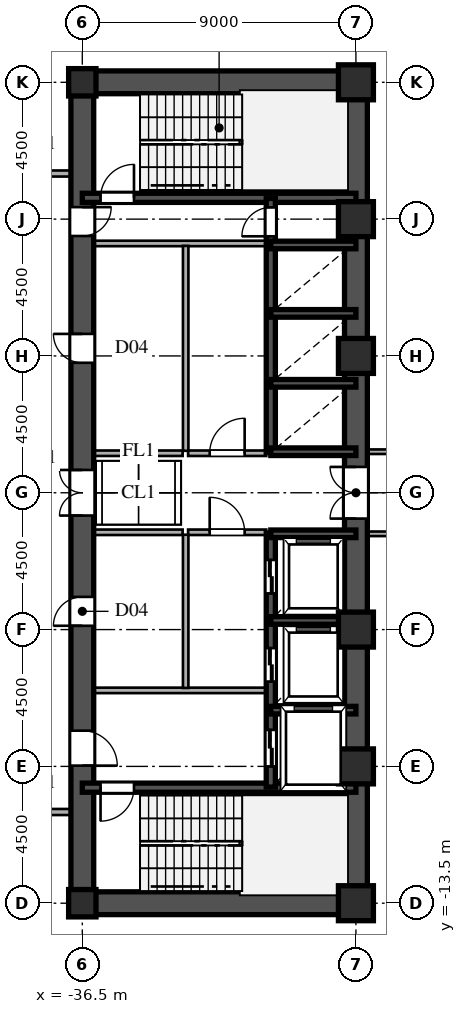
"""IFC4 building model, lengths in metres.
Left out: names, types, materials, properties, quantities, classifications, styles, units other than length and angle.
Written with IfcOpenShell. Run it as: python <this file> out.ifc"""

import sys

from ifc_helpers import new_model, si_unit, direction, frame, frame_2d, origin, origin_2d, place, context, subcontext, project, spatial, rectangle, hollow_rectangle, i_section, extrude, source, transform, mapped, element, fill, save


model = new_model("IFC4")
c1 = context("Model", 3, precision=1e-05, world=origin(), true_north=direction((0.0, 1.0)))
c2 = subcontext(c1, "Body", "Model", "MODEL_VIEW")
j1 = project(units=[si_unit("LENGTHUNIT", "METRE"), si_unit("PLANEANGLEUNIT", "RADIAN")], contexts=[c1])
p1 = place(None, origin())
s1 = spatial("IfcSite", under=j1, at=p1, CompositionType="ELEMENT")
p2 = place(p1, origin())
s2 = spatial("IfcBuilding", under=s1, at=p2, CompositionType="ELEMENT")
p3 = place(p2, frame((0.0, 0.0, 5.4)))
s3 = spatial("IfcBuildingStorey", under=s2, at=p3, CompositionType="ELEMENT", Elevation=5.4)
m1 = source(origin(), c2, "Body", "SweptSolid", [
    extrude(hollow_rectangle(XDim=1.15, YDim=1.15, WallThickness=0.048, at=origin_2d()), origin(), (0.0, 0.0, 1.0), 4.5),
])
for number, where, z_axis, x_axis in (
    (1, (-27.5, -13.5, 0.0), (0.0, 0.0, 1.0), (1.0, 0.0, 0.0)),
    (2, (-27.5, -9.0, 0.0), (0.0, 0.0, 1.0), (1.0, 0.0, 0.0)),
    (3, (-27.5, -4.5, 0.0), (0.0, 0.0, 1.0), (1.0, 0.0, 0.0)),
    (4, (-27.5, 4.5, 0.0), (0.0, 0.0, 1.0), (1.0, 0.0, 0.0)),
    (5, (-27.5, 9.0, 0.0), (0.0, 0.0, 1.0), (1.0, 0.0, 0.0)),
    (6, (-27.5, 13.5, 0.0), (0.0, 0.0, 1.0), (1.0, 0.0, 0.0)),
):
    element("IfcColumn", number, at=place(p3, frame(where, z_axis=z_axis, x_axis=x_axis)), inside=s3, PredefinedType="COLUMN", context=c2, shape_type="MappedRepresentation", body=[
        mapped(m1, transform((0.0, 0.0, 0.0), scale=1.0)),
    ])
m2 = source(origin(), c2, "Body", "SweptSolid", [
    extrude(i_section(OverallWidth=0.9, OverallDepth=0.9, WebThickness=0.036, FlangeThickness=0.055, at=origin_2d()), origin(), (0.0, 0.0, 1.0), 4.5),
])
for number, where, z_axis, x_axis in (
    (7, (-36.5, -13.5, 0.0), (0.0, 0.0, 1.0), (1.0, 0.0, 0.0)),
    (8, (-36.5, 13.5, 0.0), (0.0, 0.0, 1.0), (1.0, 0.0, 0.0)),
):
    element("IfcColumn", number, at=place(p3, frame(where, z_axis=z_axis, x_axis=x_axis)), inside=s3, PredefinedType="COLUMN", context=c2, shape_type="MappedRepresentation", body=[
        mapped(m2, transform((0.0, 0.0, 0.0), scale=1.0)),
    ])
for number, where, z_axis, x_axis in (
    (9, (-27.5, -13.5, 0.0), (0.0, 0.0, 1.0), (0.0, 1.0, 0.0)),
    (10, (-27.5, 1.3, 0.0), (0.0, 0.0, 1.0), (0.0, 1.0, 0.0)),
):
    element("IfcWall", number, at=place(p3, frame(where, z_axis=z_axis, x_axis=x_axis)), inside=s3, PredefinedType="SHEAR", context=c2, shape_type="SweptSolid", body=[
        extrude(rectangle(XDim=12.2, YDim=0.75, at=frame_2d((6.1, 0.0))), origin(), (0.0, 0.0, 1.0), 4.22),
    ])
p4 = place(p3, frame((-27.5, -1.3, 0.0), z_axis=(0.0, 0.0, 1.0), x_axis=(0.0, 1.0, 0.0)))
e11 = element("IfcWall", 11, at=p4, inside=s3, PredefinedType="SHEAR", context=c2, shape_type="SweptSolid", body=[
    extrude(rectangle(XDim=2.6, YDim=0.75, at=frame_2d((1.3, 0.0))), origin(), (0.0, 0.0, 1.0), 4.22),
])
p5 = place(p4, frame((0.45, 0.0, 0.0)))
e12 = element("IfcOpeningElement", 12, at=p5, cuts=e11, PredefinedType="OPENING", context=c2, shape_type="SweptSolid", body=[
    extrude(rectangle(XDim=1.7, YDim=2.35, at=frame_2d((0.85, 1.175))), frame((0.0, 0.385, 0.0), z_axis=(0.0, -1.0, 0.0), x_axis=(1.0, 0.0, 0.0)), (0.0, 0.0, 1.0), 0.77),
])
for number, where, z_axis, x_axis in (
    (13, (-36.5, -13.5, 0.0), (0.0, 0.0, 1.0), (1.0, 0.0, 0.0)),
    (14, (-36.5, 13.5, 0.0), (0.0, 0.0, 1.0), (1.0, 0.0, 0.0)),
):
    element("IfcWall", number, at=place(p3, frame(where, z_axis=z_axis, x_axis=x_axis)), inside=s3, PredefinedType="SHEAR", context=c2, shape_type="SweptSolid", body=[
        extrude(rectangle(XDim=9.0, YDim=0.75, at=frame_2d((4.5, 0.0))), origin(), (0.0, 0.0, 1.0), 4.22),
    ])
p6 = place(p3, frame((-36.5, -13.65, 0.0), z_axis=(0.0, 0.0, 1.0), x_axis=(0.0, 1.0, 0.0)))
e15 = element("IfcWall", 15, at=p6, inside=s3, PredefinedType="SHEAR", context=c2, shape_type="SweptSolid", body=[
    extrude(rectangle(XDim=7.15, YDim=0.75, at=frame_2d((3.575, 0.0))), origin(), (0.0, 0.0, 1.0), 4.22),
])
p7 = place(p6, frame((4.675, 0.0, 0.0)))
e16 = element("IfcOpeningElement", 16, at=p7, cuts=e15, PredefinedType="OPENING", context=c2, shape_type="SweptSolid", body=[
    extrude(rectangle(XDim=1.15, YDim=2.2, at=frame_2d((0.575, 1.1))), frame((0.0, 0.385, 0.0), z_axis=(0.0, -1.0, 0.0), x_axis=(1.0, 0.0, 0.0)), (0.0, 0.0, 1.0), 0.77),
])
p8 = place(p3, frame((-36.5, -1.3, 0.0), z_axis=(0.0, 0.0, 1.0), x_axis=(0.0, 1.0, 0.0)))
e17 = element("IfcWall", 17, at=p8, inside=s3, PredefinedType="SHEAR", context=c2, shape_type="SweptSolid", body=[
    extrude(rectangle(XDim=2.6, YDim=0.75, at=frame_2d((1.3, 0.0))), origin(), (0.0, 0.0, 1.0), 4.22),
])
p9 = place(p8, frame((0.55, 0.0, 0.0)))
e18 = element("IfcOpeningElement", 18, at=p9, cuts=e17, PredefinedType="OPENING", context=c2, shape_type="SweptSolid", body=[
    extrude(rectangle(XDim=1.5, YDim=2.3, at=frame_2d((0.75, 1.15))), frame((0.0, 0.385, 0.0), z_axis=(0.0, -1.0, 0.0), x_axis=(1.0, 0.0, 0.0)), (0.0, 0.0, 1.0), 0.77),
])
p10 = place(p3, frame((-36.5, 8.2, 0.0), z_axis=(0.0, 0.0, 1.0), x_axis=(0.0, 1.0, 0.0)))
e19 = element("IfcWall", 19, at=p10, inside=s3, PredefinedType="SHEAR", context=c2, shape_type="SweptSolid", body=[
    extrude(rectangle(XDim=5.45, YDim=0.75, at=frame_2d((2.725, 0.0))), origin(), (0.0, 0.0, 1.0), 4.22),
])
p11 = place(p10, frame((0.245, 0.0, 0.0)))
e20 = element("IfcOpeningElement", 20, at=p11, cuts=e19, PredefinedType="OPENING", context=c2, shape_type="SweptSolid", body=[
    extrude(rectangle(XDim=0.95, YDim=2.15, at=frame_2d((0.475, 1.075))), frame((0.0, 0.385, 0.0), z_axis=(0.0, -1.0, 0.0), x_axis=(1.0, 0.0, 0.0)), (0.0, 0.0, 1.0), 0.77),
])
p12 = place(p3, frame((-36.5, -6.5, 0.0), z_axis=(0.0, 0.0, 1.0), x_axis=(0.0, 1.0, 0.0)))
e21 = element("IfcWall", 21, at=p12, inside=s3, PredefinedType="SHEAR", context=c2, shape_type="SweptSolid", body=[
    extrude(rectangle(XDim=5.2, YDim=0.75, at=frame_2d((2.6, 0.0))), origin(), (0.0, 0.0, 1.0), 4.22),
])
p13 = place(p12, frame((2.125, 0.0, 0.0)))
e22 = element("IfcOpeningElement", 22, at=p13, cuts=e21, PredefinedType="OPENING", context=c2, shape_type="SweptSolid", body=[
    extrude(rectangle(XDim=0.95, YDim=2.15, at=frame_2d((0.475, 1.075))), frame((0.0, 0.385, 0.0), z_axis=(0.0, -1.0, 0.0), x_axis=(1.0, 0.0, 0.0)), (0.0, 0.0, 1.0), 0.77),
])
p14 = place(p3, frame((-36.5, 1.3, 0.0), z_axis=(0.0, 0.0, 1.0), x_axis=(0.0, 1.0, 0.0)))
e23 = element("IfcWall", 23, at=p14, inside=s3, PredefinedType="SHEAR", context=c2, shape_type="SweptSolid", body=[
    extrude(rectangle(XDim=6.9, YDim=0.75, at=frame_2d((3.45, 0.0))), origin(), (0.0, 0.0, 1.0), 4.22),
])
p15 = place(p14, frame((2.975, 0.0, 0.0)))
e24 = element("IfcOpeningElement", 24, at=p15, cuts=e23, PredefinedType="OPENING", context=c2, shape_type="SweptSolid", body=[
    extrude(rectangle(XDim=0.95, YDim=2.15, at=frame_2d((0.475, 1.075))), frame((0.0, 0.385, 0.0), z_axis=(0.0, -1.0, 0.0), x_axis=(1.0, 0.0, 0.0)), (0.0, 0.0, 1.0), 0.77),
])
p16 = place(p3, frame((-36.5, -9.7, 0.0), z_axis=(0.0, 0.0, 1.0), x_axis=(1.0, 0.0, 0.0)))
e25 = element("IfcWall", 25, at=p16, inside=s3, PredefinedType="SHEAR", context=c2, shape_type="SweptSolid", body=[
    extrude(rectangle(XDim=9.0, YDim=0.3, at=frame_2d((4.5, 0.0))), origin(), (0.0, 0.0, 1.0), 4.22),
])
p17 = place(p16, frame((0.6, 0.0, 0.0)))
e26 = element("IfcOpeningElement", 26, at=p17, cuts=e25, PredefinedType="OPENING", context=c2, shape_type="SweptSolid", body=[
    extrude(rectangle(XDim=1.1, YDim=2.2, at=frame_2d((0.55, 1.1))), frame((0.0, 0.16, 0.0), z_axis=(0.0, -1.0, 0.0), x_axis=(1.0, 0.0, 0.0)), (0.0, 0.0, 1.0), 0.32),
])
p18 = place(p3, frame((-36.5, 9.7, 0.0), z_axis=(0.0, 0.0, 1.0), x_axis=(1.0, 0.0, 0.0)))
e27 = element("IfcWall", 27, at=p18, inside=s3, PredefinedType="SHEAR", context=c2, shape_type="SweptSolid", body=[
    extrude(rectangle(XDim=9.0, YDim=0.3, at=frame_2d((4.5, 0.0))), origin(), (0.0, 0.0, 1.0), 4.22),
])
p19 = place(p18, frame((0.6, 0.0, 0.0)))
e28 = element("IfcOpeningElement", 28, at=p19, cuts=e27, PredefinedType="OPENING", context=c2, shape_type="SweptSolid", body=[
    extrude(rectangle(XDim=1.1, YDim=2.2, at=frame_2d((0.55, 1.1))), frame((0.0, 0.16, 0.0), z_axis=(0.0, -1.0, 0.0), x_axis=(1.0, 0.0, 0.0)), (0.0, 0.0, 1.0), 0.32),
])
for number, where, z_axis, x_axis in (
    (29, (-30.3, -7.15, 0.0), (0.0, 0.0, 1.0), (1.0, 0.0, 0.0)),
    (30, (-30.3, -4.2, 0.0), (0.0, 0.0, 1.0), (1.0, 0.0, 0.0)),
    (31, (-30.3, -1.35, 0.0), (0.0, 0.0, 1.0), (1.0, 0.0, 0.0)),
    (32, (-30.3, 1.35, 0.0), (0.0, 0.0, 1.0), (1.0, 0.0, 0.0)),
    (33, (-30.3, 3.6, 0.0), (0.0, 0.0, 1.0), (1.0, 0.0, 0.0)),
    (34, (-30.3, 5.9, 0.0), (0.0, 0.0, 1.0), (1.0, 0.0, 0.0)),
    (35, (-30.3, 8.15, 0.0), (0.0, 0.0, 1.0), (1.0, 0.0, 0.0)),
):
    element("IfcWall", number, at=place(p3, frame(where, z_axis=z_axis, x_axis=x_axis)), inside=s3, PredefinedType="SHEAR", context=c2, shape_type="SweptSolid", body=[
        extrude(rectangle(XDim=2.8, YDim=0.25, at=frame_2d((1.4, 0.0))), origin(), (0.0, 0.0, 1.0), 4.22),
    ])
p20 = place(p3, frame((-30.3, -9.68, 0.0), z_axis=(0.0, 0.0, 1.0), x_axis=(0.0, 1.0, 0.0)))
e36 = element("IfcWall", 36, at=p20, inside=s3, PredefinedType="SHEAR", context=c2, shape_type="SweptSolid", body=[
    extrude(rectangle(XDim=2.56, YDim=0.3, at=frame_2d((1.28, 0.0))), origin(), (0.0, 0.0, 1.0), 4.22),
])
p21 = place(p20, frame((0.68, 0.0, 0.0)))
e37 = element("IfcOpeningElement", 37, at=p21, cuts=e36, PredefinedType="OPENING", context=c2, shape_type="SweptSolid", body=[
    extrude(rectangle(XDim=1.2, YDim=2.25, at=frame_2d((0.6, 1.125))), frame((0.0, 0.16, 0.0), z_axis=(0.0, -1.0, 0.0), x_axis=(1.0, 0.0, 0.0)), (0.0, 0.0, 1.0), 0.32),
])
p22 = place(p3, frame((-30.3, -7.12, 0.0), z_axis=(0.0, 0.0, 1.0), x_axis=(0.0, 1.0, 0.0)))
e38 = element("IfcWall", 38, at=p22, inside=s3, PredefinedType="SHEAR", context=c2, shape_type="SweptSolid", body=[
    extrude(rectangle(XDim=2.92, YDim=0.3, at=frame_2d((1.46, 0.0))), origin(), (0.0, 0.0, 1.0), 4.22),
])
p23 = place(p22, frame((0.91, 0.0, 0.0)))
e39 = element("IfcOpeningElement", 39, at=p23, cuts=e38, PredefinedType="OPENING", context=c2, shape_type="SweptSolid", body=[
    extrude(rectangle(XDim=1.1, YDim=2.2, at=frame_2d((0.55, 1.1))), frame((0.0, 0.16, 0.0), z_axis=(0.0, -1.0, 0.0), x_axis=(1.0, 0.0, 0.0)), (0.0, 0.0, 1.0), 0.32),
])
p24 = place(p3, frame((-30.3, -4.2, 0.0), z_axis=(0.0, 0.0, 1.0), x_axis=(0.0, 1.0, 0.0)))
e40 = element("IfcWall", 40, at=p24, inside=s3, PredefinedType="SHEAR", context=c2, shape_type="SweptSolid", body=[
    extrude(rectangle(XDim=2.88, YDim=0.3, at=frame_2d((1.44, 0.0))), origin(), (0.0, 0.0, 1.0), 4.22),
])
p25 = place(p24, frame((0.89, 0.0, 0.0)))
e41 = element("IfcOpeningElement", 41, at=p25, cuts=e40, PredefinedType="OPENING", context=c2, shape_type="SweptSolid", body=[
    extrude(rectangle(XDim=1.1, YDim=2.2, at=frame_2d((0.55, 1.1))), frame((0.0, 0.16, 0.0), z_axis=(0.0, -1.0, 0.0), x_axis=(1.0, 0.0, 0.0)), (0.0, 0.0, 1.0), 0.32),
])
p26 = place(p3, frame((-30.3, 1.32, 0.0), z_axis=(0.0, 0.0, 1.0), x_axis=(0.0, 1.0, 0.0)))
e42 = element("IfcWall", 42, at=p26, inside=s3, PredefinedType="SHEAR", context=c2, shape_type="SweptSolid", body=[
    extrude(rectangle(XDim=2.28, YDim=0.3, at=frame_2d((1.14, 0.0))), origin(), (0.0, 0.0, 1.0), 4.22),
])
p27 = place(p3, frame((-30.3, 3.6, 0.0), z_axis=(0.0, 0.0, 1.0), x_axis=(0.0, 1.0, 0.0)))
e43 = element("IfcWall", 43, at=p27, inside=s3, PredefinedType="SHEAR", context=c2, shape_type="SweptSolid", body=[
    extrude(rectangle(XDim=2.3, YDim=0.3, at=frame_2d((1.15, 0.0))), origin(), (0.0, 0.0, 1.0), 4.22),
])
p28 = place(p3, frame((-30.3, 5.9, 0.0), z_axis=(0.0, 0.0, 1.0), x_axis=(0.0, 1.0, 0.0)))
e44 = element("IfcWall", 44, at=p28, inside=s3, PredefinedType="SHEAR", context=c2, shape_type="SweptSolid", body=[
    extrude(rectangle(XDim=2.25, YDim=0.3, at=frame_2d((1.125, 0.0))), origin(), (0.0, 0.0, 1.0), 4.22),
])
p29 = place(p3, frame((-30.3, 8.15, 0.0), z_axis=(0.0, 0.0, 1.0), x_axis=(0.0, 1.0, 0.0)))
e45 = element("IfcWall", 45, at=p29, inside=s3, PredefinedType="SHEAR", context=c2, shape_type="SweptSolid", body=[
    extrude(rectangle(XDim=1.53, YDim=0.3, at=frame_2d((0.765, 0.0))), origin(), (0.0, 0.0, 1.0), 4.22),
])
p30 = place(p29, frame((0.285, 0.0, 0.0)))
e46 = element("IfcOpeningElement", 46, at=p30, cuts=e45, PredefinedType="OPENING", context=c2, shape_type="SweptSolid", body=[
    extrude(rectangle(XDim=0.95, YDim=2.15, at=frame_2d((0.475, 1.075))), frame((0.0, 0.16, 0.0), z_axis=(0.0, -1.0, 0.0), x_axis=(1.0, 0.0, 0.0)), (0.0, 0.0, 1.0), 0.32),
])
for number, where, z_axis, x_axis in (
    (47, (-36.15, -6.5, 0.0), (0.0, 0.0, 1.0), (1.0, 0.0, 0.0)),
    (48, (-36.15, 8.2, 0.0), (0.0, 0.0, 1.0), (1.0, 0.0, 0.0)),
):
    element("IfcWall", number, at=place(p3, frame(where, z_axis=z_axis, x_axis=x_axis)), inside=s3, PredefinedType="PARTITIONING", context=c2, shape_type="SweptSolid", body=[
        extrude(rectangle(XDim=5.7, YDim=0.18, at=frame_2d((2.85, 0.0))), origin(), (0.0, 0.0, 1.0), 4.22),
    ])
p31 = place(p3, frame((-33.1, -6.42, 0.0), z_axis=(0.0, 0.0, 1.0), x_axis=(0.0, 1.0, 0.0)))
e49 = element("IfcWall", 49, at=p31, inside=s3, PredefinedType="PARTITIONING", context=c2, shape_type="SweptSolid", body=[
    extrude(rectangle(XDim=5.04, YDim=0.18, at=frame_2d((2.52, 0.0))), origin(), (0.0, 0.0, 1.0), 4.22),
])
p32 = place(p3, frame((-33.1, 1.38, 0.0), z_axis=(0.0, 0.0, 1.0), x_axis=(0.0, 1.0, 0.0)))
e50 = element("IfcWall", 50, at=p32, inside=s3, PredefinedType="PARTITIONING", context=c2, shape_type="SweptSolid", body=[
    extrude(rectangle(XDim=6.74, YDim=0.18, at=frame_2d((3.37, 0.0))), origin(), (0.0, 0.0, 1.0), 4.22),
])
p33 = place(p3, frame((-33.02, -1.3, 0.0), z_axis=(0.0, 0.0, 1.0), x_axis=(1.0, 0.0, 0.0)))
e51 = element("IfcWall", 51, at=p33, inside=s3, PredefinedType="PARTITIONING", context=c2, shape_type="SweptSolid", body=[
    extrude(rectangle(XDim=2.57, YDim=0.18, at=frame_2d((1.285, 0.0))), origin(), (0.0, 0.0, 1.0), 4.22),
])
p34 = place(p33, frame((0.71, 0.0, 0.0)))
e52 = element("IfcOpeningElement", 52, at=p34, cuts=e51, PredefinedType="OPENING", context=c2, shape_type="SweptSolid", body=[
    extrude(rectangle(XDim=1.15, YDim=2.2, at=frame_2d((0.575, 1.1))), frame((0.0, 0.1, 0.0), z_axis=(0.0, -1.0, 0.0), x_axis=(1.0, 0.0, 0.0)), (0.0, 0.0, 1.0), 0.2),
])
p35 = place(p3, frame((-33.02, 1.3, 0.0), z_axis=(0.0, 0.0, 1.0), x_axis=(1.0, 0.0, 0.0)))
e53 = element("IfcWall", 53, at=p35, inside=s3, PredefinedType="PARTITIONING", context=c2, shape_type="SweptSolid", body=[
    extrude(rectangle(XDim=2.57, YDim=0.18, at=frame_2d((1.285, 0.0))), origin(), (0.0, 0.0, 1.0), 4.22),
])
p36 = place(p35, frame((0.71, 0.0, 0.0)))
e54 = element("IfcOpeningElement", 54, at=p36, cuts=e53, PredefinedType="OPENING", context=c2, shape_type="SweptSolid", body=[
    extrude(rectangle(XDim=1.15, YDim=2.2, at=frame_2d((0.575, 1.1))), frame((0.0, 0.1, 0.0), z_axis=(0.0, -1.0, 0.0), x_axis=(1.0, 0.0, 0.0)), (0.0, 0.0, 1.0), 0.2),
])
for number, where, z_axis, x_axis in (
    (55, (-36.15, -1.3, 0.0), (0.0, 0.0, 1.0), (1.0, 0.0, 0.0)),
    (56, (-36.15, 1.3, 0.0), (0.0, 0.0, 1.0), (1.0, 0.0, 0.0)),
):
    element("IfcWall", number, at=place(p3, frame(where, z_axis=z_axis, x_axis=x_axis)), inside=s3, PredefinedType="PARTITIONING", context=c2, shape_type="SweptSolid", body=[
        extrude(rectangle(XDim=2.95, YDim=0.18, at=frame_2d((1.475, 0.0))), origin(), (0.0, 0.0, 1.0), 4.22),
    ])
p37 = place(p3, frame((-38.915, -10.5, 0.0), z_axis=(0.0, 0.0, 1.0), x_axis=(1.0, 0.0, 0.0)))
e57 = element("IfcWall", 57, at=p37, inside=s3, PredefinedType="PARTITIONING", context=c2, shape_type="SweptSolid", body=[
    extrude(rectangle(XDim=2.035, YDim=0.2, at=frame_2d((1.018, 0.0))), origin(), (0.0, 0.0, 1.0), 4.22),
])
for number, where, z_axis, x_axis in (
    (58, (-27.12, -1.35, 0.0), (0.0, 0.0, 1.0), (1.0, 0.0, 0.0)),
    (59, (-27.12, 1.35, 0.0), (0.0, 0.0, 1.0), (1.0, 0.0, 0.0)),
):
    element("IfcWall", number, at=place(p3, frame(where, z_axis=z_axis, x_axis=x_axis)), inside=s3, PredefinedType="PARTITIONING", context=c2, shape_type="SweptSolid", body=[
        extrude(rectangle(XDim=13.635, YDim=0.15, at=frame_2d((6.817, 0.0))), origin(), (0.0, 0.0, 1.0), 4.22),
    ])
p38 = place(p3, frame((-38.915, 10.5, 0.0), z_axis=(0.0, 0.0, 1.0), x_axis=(1.0, 0.0, 0.0)))
e60 = element("IfcWall", 60, at=p38, inside=s3, PredefinedType="PARTITIONING", context=c2, shape_type="SweptSolid", body=[
    extrude(rectangle(XDim=2.035, YDim=0.2, at=frame_2d((1.018, 0.0))), origin(), (0.0, 0.0, 1.0), 4.22),
])
m3 = source(origin(), c2, "Body", "SweptSolid", [
    extrude(rectangle(XDim=1.7, YDim=2.35, at=frame_2d((0.85, 1.175))), frame((0.0, 0.025, 0.0), z_axis=(0.0, -1.0, 0.0), x_axis=(1.0, 0.0, 0.0)), (0.0, 0.0, 1.0), 0.05),
])
p39 = place(p5, origin())
e61 = element("IfcDoor", 61, at=p39, inside=s3, OperationType="DOUBLE_SWING_LEFT", PredefinedType="DOOR", context=c2, shape_type="MappedRepresentation", body=[
    mapped(m3, transform((0.0, 0.0, 0.0), scale=1.0)),
])
fill(e12, e61)
m4 = source(origin(), c2, "Body", "SweptSolid", [
    extrude(rectangle(XDim=1.15, YDim=2.2, at=frame_2d((0.575, 1.1))), frame((0.0, 0.025, 0.0), z_axis=(0.0, -1.0, 0.0), x_axis=(1.0, 0.0, 0.0)), (0.0, 0.0, 1.0), 0.05),
])
p40 = place(p7, frame((1.15, 0.0, 0.0), z_axis=(0.0, 0.0, 1.0), x_axis=(-1.0, 0.0, 0.0)))
e62 = element("IfcDoor", 62, at=p40, inside=s3, OperationType="SINGLE_SWING_LEFT", PredefinedType="DOOR", context=c2, shape_type="MappedRepresentation", body=[
    mapped(m4, transform((0.0, 0.0, 0.0), scale=1.0)),
])
fill(e16, e62)
m5 = source(origin(), c2, "Body", "SweptSolid", [
    extrude(rectangle(XDim=1.5, YDim=2.3, at=frame_2d((0.75, 1.15))), frame((0.0, 0.025, 0.0), z_axis=(0.0, -1.0, 0.0), x_axis=(1.0, 0.0, 0.0)), (0.0, 0.0, 1.0), 0.05),
])
p41 = place(p9, origin())
e63 = element("IfcDoor", 63, at=p41, inside=s3, OperationType="DOUBLE_SWING_LEFT", PredefinedType="DOOR", context=c2, shape_type="MappedRepresentation", body=[
    mapped(m5, transform((0.0, 0.0, 0.0), scale=1.0)),
])
fill(e18, e63)
m6 = source(origin(), c2, "Body", "SweptSolid", [
    extrude(rectangle(XDim=0.95, YDim=2.15, at=frame_2d((0.475, 1.075))), frame((0.0, 0.025, 0.0), z_axis=(0.0, -1.0, 0.0), x_axis=(1.0, 0.0, 0.0)), (0.0, 0.0, 1.0), 0.05),
])
p42 = place(p11, frame((0.95, 0.0, 0.0), z_axis=(0.0, 0.0, 1.0), x_axis=(-1.0, 0.0, 0.0)))
e64 = element("IfcDoor", 64, at=p42, inside=s3, OperationType="SINGLE_SWING_RIGHT", PredefinedType="DOOR", context=c2, shape_type="MappedRepresentation", body=[
    mapped(m6, transform((0.0, 0.0, 0.0), scale=1.0)),
])
fill(e20, e64)
p43 = place(p13, origin())
e65 = element("IfcDoor", 65, at=p43, inside=s3, OperationType="SINGLE_SWING_LEFT", PredefinedType="DOOR", context=c2, shape_type="MappedRepresentation", body=[
    mapped(m6, transform((0.0, 0.0, 0.0), scale=1.0)),
])
fill(e22, e65)
p44 = place(p15, origin())
e66 = element("IfcDoor", 66, at=p44, inside=s3, OperationType="SINGLE_SWING_RIGHT", PredefinedType="DOOR", context=c2, shape_type="MappedRepresentation", body=[
    mapped(m6, transform((0.0, 0.0, 0.0), scale=1.0)),
])
fill(e24, e66)
m7 = source(origin(), c2, "Body", "SweptSolid", [
    extrude(rectangle(XDim=1.1, YDim=2.2, at=frame_2d((0.55, 1.1))), frame((0.0, 0.025, 0.0), z_axis=(0.0, -1.0, 0.0), x_axis=(1.0, 0.0, 0.0)), (0.0, 0.0, 1.0), 0.05),
])
p45 = place(p17, frame((1.1, 0.0, 0.0), z_axis=(0.0, 0.0, 1.0), x_axis=(-1.0, 0.0, 0.0)))
e67 = element("IfcDoor", 67, at=p45, inside=s3, OperationType="SINGLE_SWING_LEFT", PredefinedType="DOOR", context=c2, shape_type="MappedRepresentation", body=[
    mapped(m7, transform((0.0, 0.0, 0.0), scale=1.0)),
])
fill(e26, e67)
p46 = place(p19, origin())
e68 = element("IfcDoor", 68, at=p46, inside=s3, OperationType="SINGLE_SWING_RIGHT", PredefinedType="DOOR", context=c2, shape_type="MappedRepresentation", body=[
    mapped(m7, transform((0.0, 0.0, 0.0), scale=1.0)),
])
fill(e28, e68)
m8 = source(origin(), c2, "Body", "SweptSolid", [
    extrude(rectangle(XDim=1.2, YDim=2.25, at=frame_2d((0.6, 1.125))), frame((0.0, 0.025, 0.0), z_axis=(0.0, -1.0, 0.0), x_axis=(1.0, 0.0, 0.0)), (0.0, 0.0, 1.0), 0.05),
])
p47 = place(p21, origin())
e69 = element("IfcDoor", 69, at=p47, inside=s3, OperationType="DOUBLE_DOOR_SLIDING", PredefinedType="DOOR", context=c2, shape_type="MappedRepresentation", body=[
    mapped(m8, transform((0.0, 0.0, 0.0), scale=1.0)),
])
fill(e37, e69)
m9 = source(origin(), c2, "Body", "SweptSolid", [
    extrude(rectangle(XDim=1.1, YDim=2.2, at=frame_2d((0.55, 1.1))), frame((0.0, 0.025, 0.0), z_axis=(0.0, -1.0, 0.0), x_axis=(1.0, 0.0, 0.0)), (0.0, 0.0, 1.0), 0.05),
])
p48 = place(p23, origin())
e70 = element("IfcDoor", 70, at=p48, inside=s3, OperationType="DOUBLE_DOOR_SLIDING", PredefinedType="DOOR", context=c2, shape_type="MappedRepresentation", body=[
    mapped(m9, transform((0.0, 0.0, 0.0), scale=1.0)),
])
fill(e39, e70)
p49 = place(p25, origin())
e71 = element("IfcDoor", 71, at=p49, inside=s3, OperationType="DOUBLE_DOOR_SLIDING", PredefinedType="DOOR", context=c2, shape_type="MappedRepresentation", body=[
    mapped(m9, transform((0.0, 0.0, 0.0), scale=1.0)),
])
fill(e41, e71)
p50 = place(p30, origin())
e72 = element("IfcDoor", 72, at=p50, inside=s3, OperationType="SINGLE_SWING_LEFT", PredefinedType="DOOR", context=c2, shape_type="MappedRepresentation", body=[
    mapped(m6, transform((0.0, 0.0, 0.0), scale=1.0)),
])
fill(e46, e72)
p51 = place(p34, origin())
e73 = element("IfcDoor", 73, at=p51, inside=s3, OperationType="SINGLE_SWING_LEFT", PredefinedType="DOOR", context=c2, shape_type="MappedRepresentation", body=[
    mapped(m4, transform((0.0, 0.0, 0.0), scale=1.0)),
])
fill(e52, e73)
p52 = place(p36, origin())
e74 = element("IfcDoor", 74, at=p52, inside=s3, OperationType="SINGLE_SWING_RIGHT", PredefinedType="DOOR", context=c2, shape_type="MappedRepresentation", body=[
    mapped(m4, transform((0.0, 0.0, 0.0), scale=1.0)),
])
fill(e54, e74)
save(model, sys.argv[1])
